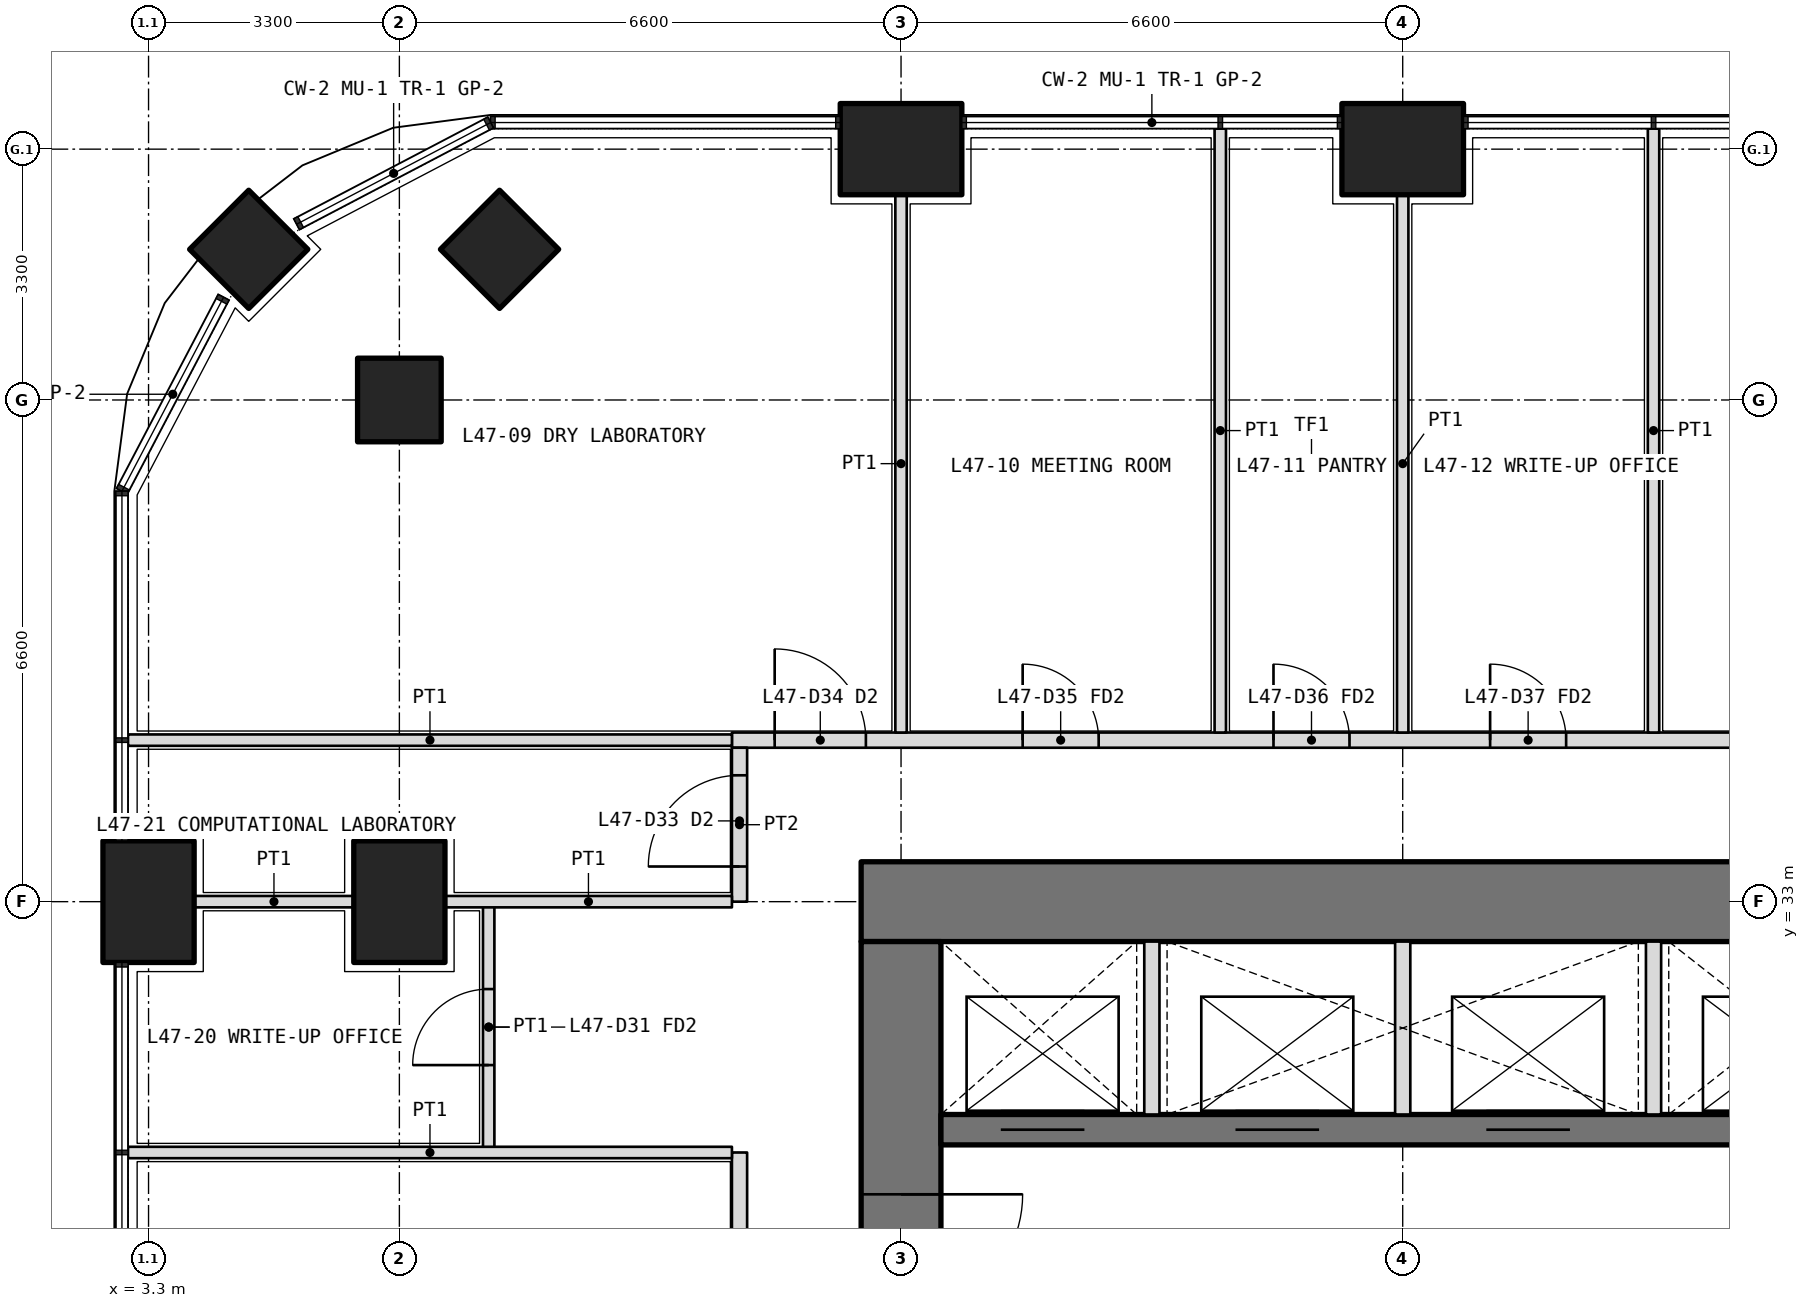
"""IFC4 building model, lengths in metres.
Left out: names, types, materials, properties, quantities, classifications, styles, units other than length and angle.
Written with IfcOpenShell. Run it as: python <this file> out.ifc"""

import sys

from ifc_helpers import new_model, si_unit, direction, frame, frame_2d, origin, origin_2d, place, context, subcontext, project, spatial, rectangle, extrude, element, fill, save


model = new_model("IFC4")
c1 = context("Model", 3, precision=1e-05, world=origin(), true_north=direction((0.0, 1.0)))
c2 = subcontext(c1, "Body", "Model", "MODEL_VIEW")
j1 = project(units=[si_unit("LENGTHUNIT", "METRE"), si_unit("PLANEANGLEUNIT", "RADIAN")], contexts=[c1])
p1 = place(None, origin())
s1 = spatial("IfcSite", under=j1, at=p1, CompositionType="ELEMENT")
p2 = place(p1, origin())
s2 = spatial("IfcBuilding", under=s1, at=p2, CompositionType="ELEMENT")
p3 = place(p2, frame((0.0, 0.0, 206.1)))
s3 = spatial("IfcBuildingStorey", under=s2, at=p3, CompositionType="ELEMENT", Elevation=206.1)
p4 = place(p3, frame((4.618, 41.582, 0.0), z_axis=(0.0, 0.0, 1.0), x_axis=(0.707106781187, 0.707106781187, 0.0)))
e1 = element("IfcColumn", 1, at=p4, inside=s3, PredefinedType="COLUMN", context=c2, shape_type="SweptSolid", body=[
    extrude(rectangle(XDim=1.1, YDim=1.1, at=origin_2d()), origin(), (0.0, 0.0, 1.0), 4.2),
])
for number, where, z_axis, x_axis in (
    (2, (3.3, 33.0, 0.0), (0.0, 0.0, 1.0), (0.0, 1.0, 0.0)),
    (3, (13.2, 42.9, 0.0), (0.0, 0.0, 1.0), (1.0, 0.0, 0.0)),
    (4, (19.8, 42.9, 0.0), (0.0, 0.0, 1.0), (1.0, 0.0, 0.0)),
):
    element("IfcColumn", number, at=place(p3, frame(where, z_axis=z_axis, x_axis=x_axis)), inside=s3, PredefinedType="COLUMN", context=c2, shape_type="SweptSolid", body=[
        extrude(rectangle(XDim=1.6, YDim=1.2, at=origin_2d()), origin(), (0.0, 0.0, 1.0), 4.2),
    ])
for number, where, z_axis, x_axis in (
    (5, (6.6, 39.6, 0.0), (0.0, 0.0, 1.0), (1.0, 0.0, 0.0)),
    (6, (7.918, 41.582, 0.0), (0.0, 0.0, 1.0), (0.707, 0.707, 0.0)),
):
    element("IfcColumn", number, at=place(p3, frame(where, z_axis=z_axis, x_axis=x_axis)), inside=s3, PredefinedType="COLUMN", context=c2, shape_type="SweptSolid", body=[
        extrude(rectangle(XDim=1.1, YDim=1.1, at=origin_2d()), origin(), (0.0, 0.0, 1.0), 4.2),
    ])
p5 = place(p3, frame((6.6, 33.0, 0.0), z_axis=(0.0, 0.0, 1.0), x_axis=(0.0, 1.0, 0.0)))
e7 = element("IfcColumn", 7, at=p5, inside=s3, PredefinedType="COLUMN", context=c2, shape_type="SweptSolid", body=[
    extrude(rectangle(XDim=1.6, YDim=1.2, at=origin_2d()), origin(), (0.0, 0.0, 1.0), 4.2),
])
p6 = place(p3, frame((40.125, 33.0, 0.0), z_axis=(0.0, 0.0, 1.0), x_axis=(-1.0, 0.0, 0.0)))
e8 = element("IfcWall", 8, at=p6, inside=s3, PredefinedType="SHEAR", context=c2, shape_type="SweptSolid", body=[
    extrude(rectangle(XDim=27.45, YDim=1.05, at=frame_2d((13.725, 0.0))), origin(), (0.0, 0.0, 1.0), 4.2),
])
p7 = place(p3, frame((13.2, 32.475, 0.0), z_axis=(0.0, 0.0, 1.0), x_axis=(0.0, -1.0, 0.0)))
e9 = element("IfcWall", 9, at=p7, inside=s3, PredefinedType="SHEAR", context=c2, shape_type="SweptSolid", body=[
    extrude(rectangle(XDim=18.75, YDim=1.05, at=frame_2d((9.375, 0.0))), origin(), (0.0, 0.0, 1.0), 4.2),
])
p8 = place(p7, frame((14.125, 0.0, 0.0)))
e10 = element("IfcOpeningElement", 10, at=p8, cuts=e9, PredefinedType="OPENING", context=c2, shape_type="SweptSolid", body=[
    extrude(rectangle(XDim=1.6, YDim=2.1, at=frame_2d((0.8, 1.05))), frame((0.0, 0.535, 0.0), z_axis=(0.0, -1.0, 0.0), x_axis=(1.0, 0.0, 0.0)), (0.0, 0.0, 1.0), 1.07),
])
p9 = place(p7, frame((3.325, 0.0, 0.0)))
e11 = element("IfcOpeningElement", 11, at=p9, cuts=e9, PredefinedType="OPENING", context=c2, shape_type="SweptSolid", body=[
    extrude(rectangle(XDim=1.6, YDim=2.1, at=frame_2d((0.8, 1.05))), frame((0.0, 0.535, 0.0), z_axis=(0.0, -1.0, 0.0), x_axis=(1.0, 0.0, 0.0)), (0.0, 0.0, 1.0), 1.07),
])
p10 = place(p3, frame((13.725, 30.0, 0.0), z_axis=(0.0, 0.0, 1.0), x_axis=(1.0, 0.0, 0.0)))
e12 = element("IfcWall", 12, at=p10, inside=s3, PredefinedType="SHEAR", context=c2, shape_type="SweptSolid", body=[
    extrude(rectangle(XDim=25.35, YDim=0.4, at=frame_2d((12.675, 0.0))), origin(), (0.0, 0.0, 1.0), 4.2),
])
p11 = place(p10, frame((0.788, 0.0, 0.0)))
e13 = element("IfcOpeningElement", 13, at=p11, cuts=e12, PredefinedType="OPENING", context=c2, shape_type="SweptSolid", body=[
    extrude(rectangle(XDim=1.1, YDim=2.1, at=frame_2d((0.55, 1.05))), frame((0.0, 0.21, 0.0), z_axis=(0.0, -1.0, 0.0), x_axis=(1.0, 0.0, 0.0)), (0.0, 0.0, 1.0), 0.42),
])
p12 = place(p10, frame((3.875, 0.0, 0.0)))
e14 = element("IfcOpeningElement", 14, at=p12, cuts=e12, PredefinedType="OPENING", context=c2, shape_type="SweptSolid", body=[
    extrude(rectangle(XDim=1.1, YDim=2.1, at=frame_2d((0.55, 1.05))), frame((0.0, 0.21, 0.0), z_axis=(0.0, -1.0, 0.0), x_axis=(1.0, 0.0, 0.0)), (0.0, 0.0, 1.0), 0.42),
])
p13 = place(p10, frame((7.175, 0.0, 0.0)))
e15 = element("IfcOpeningElement", 15, at=p13, cuts=e12, PredefinedType="OPENING", context=c2, shape_type="SweptSolid", body=[
    extrude(rectangle(XDim=1.1, YDim=2.1, at=frame_2d((0.55, 1.05))), frame((0.0, 0.21, 0.0), z_axis=(0.0, -1.0, 0.0), x_axis=(1.0, 0.0, 0.0)), (0.0, 0.0, 1.0), 0.42),
])
p14 = place(p10, frame((10.475, 0.0, 0.0)))
e16 = element("IfcOpeningElement", 16, at=p14, cuts=e12, PredefinedType="OPENING", context=c2, shape_type="SweptSolid", body=[
    extrude(rectangle(XDim=1.1, YDim=2.1, at=frame_2d((0.55, 1.05))), frame((0.0, 0.21, 0.0), z_axis=(0.0, -1.0, 0.0), x_axis=(1.0, 0.0, 0.0)), (0.0, 0.0, 1.0), 0.42),
])
for number, where, z_axis, x_axis in (
    (17, (16.5, 30.2, 0.0), (0.0, 0.0, 1.0), (0.0, 1.0, 0.0)),
    (18, (19.8, 30.2, 0.0), (0.0, 0.0, 1.0), (0.0, 1.0, 0.0)),
    (19, (23.1, 30.2, 0.0), (0.0, 0.0, 1.0), (0.0, 1.0, 0.0)),
):
    element("IfcWall", number, at=place(p3, frame(where, z_axis=z_axis, x_axis=x_axis)), inside=s3, PredefinedType="PARTITIONING", context=c2, shape_type="SweptSolid", body=[
        extrude(rectangle(XDim=2.275, YDim=0.2, at=frame_2d((1.138, 0.0))), origin(), (0.0, 0.0, 1.0), 4.2),
    ])
p15 = place(p3, frame((10.975, 35.125, 0.0), z_axis=(0.0, 0.0, 1.0), x_axis=(1.0, 0.0, 0.0)))
e20 = element("IfcWall", 20, at=p15, inside=s3, PredefinedType="PARTITIONING", context=c2, shape_type="SweptSolid", body=[
    extrude(rectangle(XDim=30.85, YDim=0.2, at=frame_2d((15.425, 0.0))), origin(), (0.0, 0.0, 1.0), 2.85),
])
p16 = place(p15, frame((0.562, 0.0, 0.0)))
e21 = element("IfcOpeningElement", 21, at=p16, cuts=e20, PredefinedType="OPENING", context=c2, shape_type="SweptSolid", body=[
    extrude(rectangle(XDim=1.2, YDim=2.1, at=frame_2d((0.6, 1.05))), frame((0.0, 0.11, 0.0), z_axis=(0.0, -1.0, 0.0), x_axis=(1.0, 0.0, 0.0)), (0.0, 0.0, 1.0), 0.22),
])
p17 = place(p15, frame((3.825, 0.0, 0.0)))
e22 = element("IfcOpeningElement", 22, at=p17, cuts=e20, PredefinedType="OPENING", context=c2, shape_type="SweptSolid", body=[
    extrude(rectangle(XDim=1.0, YDim=2.1, at=frame_2d((0.5, 1.05))), frame((0.0, 0.11, 0.0), z_axis=(0.0, -1.0, 0.0), x_axis=(1.0, 0.0, 0.0)), (0.0, 0.0, 1.0), 0.22),
])
p18 = place(p15, frame((7.125, 0.0, 0.0)))
e23 = element("IfcOpeningElement", 23, at=p18, cuts=e20, PredefinedType="OPENING", context=c2, shape_type="SweptSolid", body=[
    extrude(rectangle(XDim=1.0, YDim=2.1, at=frame_2d((0.5, 1.05))), frame((0.0, 0.11, 0.0), z_axis=(0.0, -1.0, 0.0), x_axis=(1.0, 0.0, 0.0)), (0.0, 0.0, 1.0), 0.22),
])
p19 = place(p15, frame((9.975, 0.0, 0.0)))
e24 = element("IfcOpeningElement", 24, at=p19, cuts=e20, PredefinedType="OPENING", context=c2, shape_type="SweptSolid", body=[
    extrude(rectangle(XDim=1.0, YDim=2.1, at=frame_2d((0.5, 1.05))), frame((0.0, 0.11, 0.0), z_axis=(0.0, -1.0, 0.0), x_axis=(1.0, 0.0, 0.0)), (0.0, 0.0, 1.0), 0.22),
])
p20 = place(p15, frame((20.938, 0.0, 0.0)))
e25 = element("IfcOpeningElement", 25, at=p20, cuts=e20, PredefinedType="OPENING", context=c2, shape_type="SweptSolid", body=[
    extrude(rectangle(XDim=1.0, YDim=2.1, at=frame_2d((0.5, 1.05))), frame((0.0, 0.11, 0.0), z_axis=(0.0, -1.0, 0.0), x_axis=(1.0, 0.0, 0.0)), (0.0, 0.0, 1.0), 0.22),
])
p21 = place(p3, frame((11.075, 11.175, 0.0), z_axis=(0.0, 0.0, 1.0), x_axis=(0.0, 1.0, 0.0)))
e26 = element("IfcWall", 26, at=p21, inside=s3, PredefinedType="PARTITIONING", context=c2, shape_type="SweptSolid", body=[
    extrude(rectangle(XDim=18.525, YDim=0.2, at=frame_2d((9.262, 0.0))), origin(), (0.0, 0.0, 1.0), 2.85),
])
p22 = place(p21, frame((0.363, 0.0, 0.0)))
e27 = element("IfcOpeningElement", 27, at=p22, cuts=e26, PredefinedType="OPENING", context=c2, shape_type="SweptSolid", body=[
    extrude(rectangle(XDim=1.2, YDim=2.1, at=frame_2d((0.6, 1.05))), frame((0.0, 0.11, 0.0), z_axis=(0.0, -1.0, 0.0), x_axis=(1.0, 0.0, 0.0)), (0.0, 0.0, 1.0), 0.22),
])
p23 = place(p21, frame((2.575, 0.0, 0.0)))
e28 = element("IfcOpeningElement", 28, at=p23, cuts=e26, PredefinedType="OPENING", context=c2, shape_type="SweptSolid", body=[
    extrude(rectangle(XDim=1.0, YDim=2.1, at=frame_2d((0.5, 1.05))), frame((0.0, 0.11, 0.0), z_axis=(0.0, -1.0, 0.0), x_axis=(1.0, 0.0, 0.0)), (0.0, 0.0, 1.0), 0.22),
])
p24 = place(p21, frame((5.625, 0.0, 0.0)))
e29 = element("IfcOpeningElement", 29, at=p24, cuts=e26, PredefinedType="OPENING", context=c2, shape_type="SweptSolid", body=[
    extrude(rectangle(XDim=0.9, YDim=2.1, at=frame_2d((0.45, 1.05))), frame((0.0, 0.11, 0.0), z_axis=(0.0, -1.0, 0.0), x_axis=(1.0, 0.0, 0.0)), (0.0, 0.0, 1.0), 0.22),
])
p25 = place(p21, frame((9.425, 0.0, 0.0)))
e30 = element("IfcOpeningElement", 30, at=p25, cuts=e26, PredefinedType="OPENING", context=c2, shape_type="SweptSolid", body=[
    extrude(rectangle(XDim=0.9, YDim=2.1, at=frame_2d((0.45, 1.05))), frame((0.0, 0.11, 0.0), z_axis=(0.0, -1.0, 0.0), x_axis=(1.0, 0.0, 0.0)), (0.0, 0.0, 1.0), 0.22),
])
p26 = place(p21, frame((12.975, 0.0, 0.0)))
e31 = element("IfcOpeningElement", 31, at=p26, cuts=e26, PredefinedType="OPENING", context=c2, shape_type="SweptSolid", body=[
    extrude(rectangle(XDim=1.0, YDim=2.1, at=frame_2d((0.5, 1.05))), frame((0.0, 0.11, 0.0), z_axis=(0.0, -1.0, 0.0), x_axis=(1.0, 0.0, 0.0)), (0.0, 0.0, 1.0), 0.22),
])
p27 = place(p21, frame((16.275, 0.0, 0.0)))
e32 = element("IfcOpeningElement", 32, at=p27, cuts=e26, PredefinedType="OPENING", context=c2, shape_type="SweptSolid", body=[
    extrude(rectangle(XDim=1.2, YDim=2.1, at=frame_2d((0.6, 1.05))), frame((0.0, 0.11, 0.0), z_axis=(0.0, -1.0, 0.0), x_axis=(1.0, 0.0, 0.0)), (0.0, 0.0, 1.0), 0.22),
])
p28 = place(p3, frame((11.075, 33.0, 0.0), z_axis=(0.0, 0.0, 1.0), x_axis=(0.0, 1.0, 0.0)))
e33 = element("IfcWall", 33, at=p28, inside=s3, PredefinedType="PARTITIONING", context=c2, shape_type="SweptSolid", body=[
    extrude(rectangle(XDim=2.025, YDim=0.2, at=frame_2d((1.012, 0.0))), origin(), (0.0, 0.0, 1.0), 2.85),
])
p29 = place(p28, frame((0.462, 0.0, 0.0)))
e34 = element("IfcOpeningElement", 34, at=p29, cuts=e33, PredefinedType="OPENING", context=c2, shape_type="SweptSolid", body=[
    extrude(rectangle(XDim=1.2, YDim=2.1, at=frame_2d((0.6, 1.05))), frame((0.0, 0.11, 0.0), z_axis=(0.0, -1.0, 0.0), x_axis=(1.0, 0.0, 0.0)), (0.0, 0.0, 1.0), 0.22),
])
p30 = place(p3, frame((3.03, 35.125, 0.0), z_axis=(0.0, 0.0, 1.0), x_axis=(1.0, 0.0, 0.0)))
e35 = element("IfcWall", 35, at=p30, inside=s3, PredefinedType="PARTITIONING", context=c2, shape_type="SweptSolid", body=[
    extrude(rectangle(XDim=7.945, YDim=0.15, at=frame_2d((3.973, 0.0))), origin(), (0.0, 0.0, 1.0), 2.7),
])
p31 = place(p3, frame((17.4, 43.17, 0.0), z_axis=(0.0, 0.0, 1.0), x_axis=(0.0, -1.0, 0.0)))
e36 = element("IfcWall", 36, at=p31, inside=s3, PredefinedType="PARTITIONING", context=c2, shape_type="SweptSolid", body=[
    extrude(rectangle(XDim=7.945, YDim=0.15, at=frame_2d((3.972, 0.0))), origin(), (0.0, 0.0, 1.0), 2.7),
])
for number, where, z_axis, x_axis in (
    (37, (19.8, 42.3, 0.0), (0.0, 0.0, 1.0), (0.0, -1.0, 0.0)),
    (38, (13.2, 42.3, 0.0), (0.0, 0.0, 1.0), (0.0, -1.0, 0.0)),
):
    element("IfcWall", number, at=place(p3, frame(where, z_axis=z_axis, x_axis=x_axis)), inside=s3, PredefinedType="PARTITIONING", context=c2, shape_type="SweptSolid", body=[
        extrude(rectangle(XDim=7.075, YDim=0.15, at=frame_2d((3.538, 0.0))), origin(), (0.0, 0.0, 1.0), 2.85),
    ])
p32 = place(p3, frame((23.1, 43.17, 0.0), z_axis=(0.0, 0.0, 1.0), x_axis=(0.0, -1.0, 0.0)))
e39 = element("IfcWall", 39, at=p32, inside=s3, PredefinedType="PARTITIONING", context=c2, shape_type="SweptSolid", body=[
    extrude(rectangle(XDim=7.945, YDim=0.15, at=frame_2d((3.972, 0.0))), origin(), (0.0, 0.0, 1.0), 2.7),
])
p33 = place(p3, frame((7.775, 29.7, 0.0), z_axis=(0.0, 0.0, 1.0), x_axis=(0.0, 1.0, 0.0)))
e40 = element("IfcWall", 40, at=p33, inside=s3, PredefinedType="PARTITIONING", context=c2, shape_type="SweptSolid", body=[
    extrude(rectangle(XDim=3.3, YDim=0.15, at=frame_2d((1.65, 0.0))), origin(), (0.0, 0.0, 1.0), 2.85),
])
p34 = place(p33, frame((1.15, 0.0, 0.0)))
e41 = element("IfcOpeningElement", 41, at=p34, cuts=e40, PredefinedType="OPENING", context=c2, shape_type="SweptSolid", body=[
    extrude(rectangle(XDim=1.0, YDim=2.1, at=frame_2d((0.5, 1.05))), frame((0.0, 0.085, 0.0), z_axis=(0.0, -1.0, 0.0), x_axis=(1.0, 0.0, 0.0)), (0.0, 0.0, 1.0), 0.17),
])
p35 = place(p3, frame((3.03, 29.7, 0.0), z_axis=(0.0, 0.0, 1.0), x_axis=(1.0, 0.0, 0.0)))
e42 = element("IfcWall", 42, at=p35, inside=s3, PredefinedType="PARTITIONING", context=c2, shape_type="SweptSolid", body=[
    extrude(rectangle(XDim=7.945, YDim=0.15, at=frame_2d((3.973, 0.0))), origin(), (0.0, 0.0, 1.0), 2.7),
])
p36 = place(p3, frame((3.9, 33.0, 0.0), z_axis=(0.0, 0.0, 1.0), x_axis=(1.0, 0.0, 0.0)))
e43 = element("IfcWall", 43, at=p36, inside=s3, PredefinedType="PARTITIONING", context=c2, shape_type="SweptSolid", body=[
    extrude(rectangle(XDim=2.1, YDim=0.15, at=frame_2d((1.05, 0.0))), origin(), (0.0, 0.0, 1.0), 2.85),
])
p37 = place(p3, frame((7.2, 33.0, 0.0), z_axis=(0.0, 0.0, 1.0), x_axis=(1.0, 0.0, 0.0)))
e44 = element("IfcWall", 44, at=p37, inside=s3, PredefinedType="PARTITIONING", context=c2, shape_type="SweptSolid", body=[
    extrude(rectangle(XDim=3.775, YDim=0.15, at=frame_2d((1.888, 0.0))), origin(), (0.0, 0.0, 1.0), 2.85),
])
p38 = place(p16, origin())
e45 = element("IfcDoor", 45, at=p38, inside=s3, OperationType="DOUBLE_DOOR_SINGLE_SWING", PredefinedType="DOOR", context=c2, shape_type="SweptSolid", body=[
    extrude(rectangle(XDim=1.2, YDim=2.1, at=frame_2d((0.6, 1.05))), frame((0.0, 0.025, 0.0), z_axis=(0.0, -1.0, 0.0), x_axis=(1.0, 0.0, 0.0)), (0.0, 0.0, 1.0), 0.05),
])
fill(e21, e45)
p39 = place(p17, origin())
e46 = element("IfcDoor", 46, at=p39, inside=s3, OperationType="SINGLE_SWING_LEFT", PredefinedType="DOOR", context=c2, shape_type="SweptSolid", body=[
    extrude(rectangle(XDim=1.0, YDim=2.1, at=frame_2d((0.5, 1.05))), frame((0.0, 0.025, 0.0), z_axis=(0.0, -1.0, 0.0), x_axis=(1.0, 0.0, 0.0)), (0.0, 0.0, 1.0), 0.05),
])
fill(e22, e46)
p40 = place(p18, origin())
e47 = element("IfcDoor", 47, at=p40, inside=s3, OperationType="SINGLE_SWING_LEFT", PredefinedType="DOOR", context=c2, shape_type="SweptSolid", body=[
    extrude(rectangle(XDim=1.0, YDim=2.1, at=frame_2d((0.5, 1.05))), frame((0.0, 0.025, 0.0), z_axis=(0.0, -1.0, 0.0), x_axis=(1.0, 0.0, 0.0)), (0.0, 0.0, 1.0), 0.05),
])
fill(e23, e47)
p41 = place(p19, origin())
e48 = element("IfcDoor", 48, at=p41, inside=s3, OperationType="SINGLE_SWING_LEFT", PredefinedType="DOOR", context=c2, shape_type="SweptSolid", body=[
    extrude(rectangle(XDim=1.0, YDim=2.1, at=frame_2d((0.5, 1.05))), frame((0.0, 0.025, 0.0), z_axis=(0.0, -1.0, 0.0), x_axis=(1.0, 0.0, 0.0)), (0.0, 0.0, 1.0), 0.05),
])
fill(e24, e48)
p42 = place(p34, origin())
e49 = element("IfcDoor", 49, at=p42, inside=s3, OperationType="SINGLE_SWING_LEFT", PredefinedType="DOOR", context=c2, shape_type="SweptSolid", body=[
    extrude(rectangle(XDim=1.0, YDim=2.1, at=frame_2d((0.5, 1.05))), frame((0.0, 0.025, 0.0), z_axis=(0.0, -1.0, 0.0), x_axis=(1.0, 0.0, 0.0)), (0.0, 0.0, 1.0), 0.05),
])
fill(e41, e49)
p43 = place(p29, origin())
e50 = element("IfcDoor", 50, at=p43, inside=s3, OperationType="DOUBLE_DOOR_SINGLE_SWING", PredefinedType="DOOR", context=c2, shape_type="SweptSolid", body=[
    extrude(rectangle(XDim=1.2, YDim=2.1, at=frame_2d((0.6, 1.05))), frame((0.0, 0.025, 0.0), z_axis=(0.0, -1.0, 0.0), x_axis=(1.0, 0.0, 0.0)), (0.0, 0.0, 1.0), 0.05),
])
fill(e34, e50)
p44 = place(p9, origin())
e51 = element("IfcDoor", 51, at=p44, inside=s3, OperationType="DOUBLE_DOOR_DOUBLE_SWING", PredefinedType="DOOR", context=c2, shape_type="SweptSolid", body=[
    extrude(rectangle(XDim=1.6, YDim=2.1, at=frame_2d((0.8, 1.05))), frame((0.0, 0.025, 0.0), z_axis=(0.0, -1.0, 0.0), x_axis=(1.0, 0.0, 0.0)), (0.0, 0.0, 1.0), 0.05),
])
fill(e11, e51)
p45 = place(p11, origin())
e52 = element("IfcDoor", 52, at=p45, inside=s3, OperationType="DOUBLE_DOOR_SLIDING", PredefinedType="DOOR", context=c2, shape_type="SweptSolid", body=[
    extrude(rectangle(XDim=1.1, YDim=2.1, at=frame_2d((0.55, 1.05))), frame((0.0, 0.025, 0.0), z_axis=(0.0, -1.0, 0.0), x_axis=(1.0, 0.0, 0.0)), (0.0, 0.0, 1.0), 0.05),
])
fill(e13, e52)
p46 = place(p12, origin())
e53 = element("IfcDoor", 53, at=p46, inside=s3, OperationType="DOUBLE_DOOR_SLIDING", PredefinedType="DOOR", context=c2, shape_type="SweptSolid", body=[
    extrude(rectangle(XDim=1.1, YDim=2.1, at=frame_2d((0.55, 1.05))), frame((0.0, 0.025, 0.0), z_axis=(0.0, -1.0, 0.0), x_axis=(1.0, 0.0, 0.0)), (0.0, 0.0, 1.0), 0.05),
])
fill(e14, e53)
p47 = place(p13, origin())
e54 = element("IfcDoor", 54, at=p47, inside=s3, OperationType="DOUBLE_DOOR_SLIDING", PredefinedType="DOOR", context=c2, shape_type="SweptSolid", body=[
    extrude(rectangle(XDim=1.1, YDim=2.1, at=frame_2d((0.55, 1.05))), frame((0.0, 0.025, 0.0), z_axis=(0.0, -1.0, 0.0), x_axis=(1.0, 0.0, 0.0)), (0.0, 0.0, 1.0), 0.05),
])
fill(e15, e54)
save(model, sys.argv[1])
